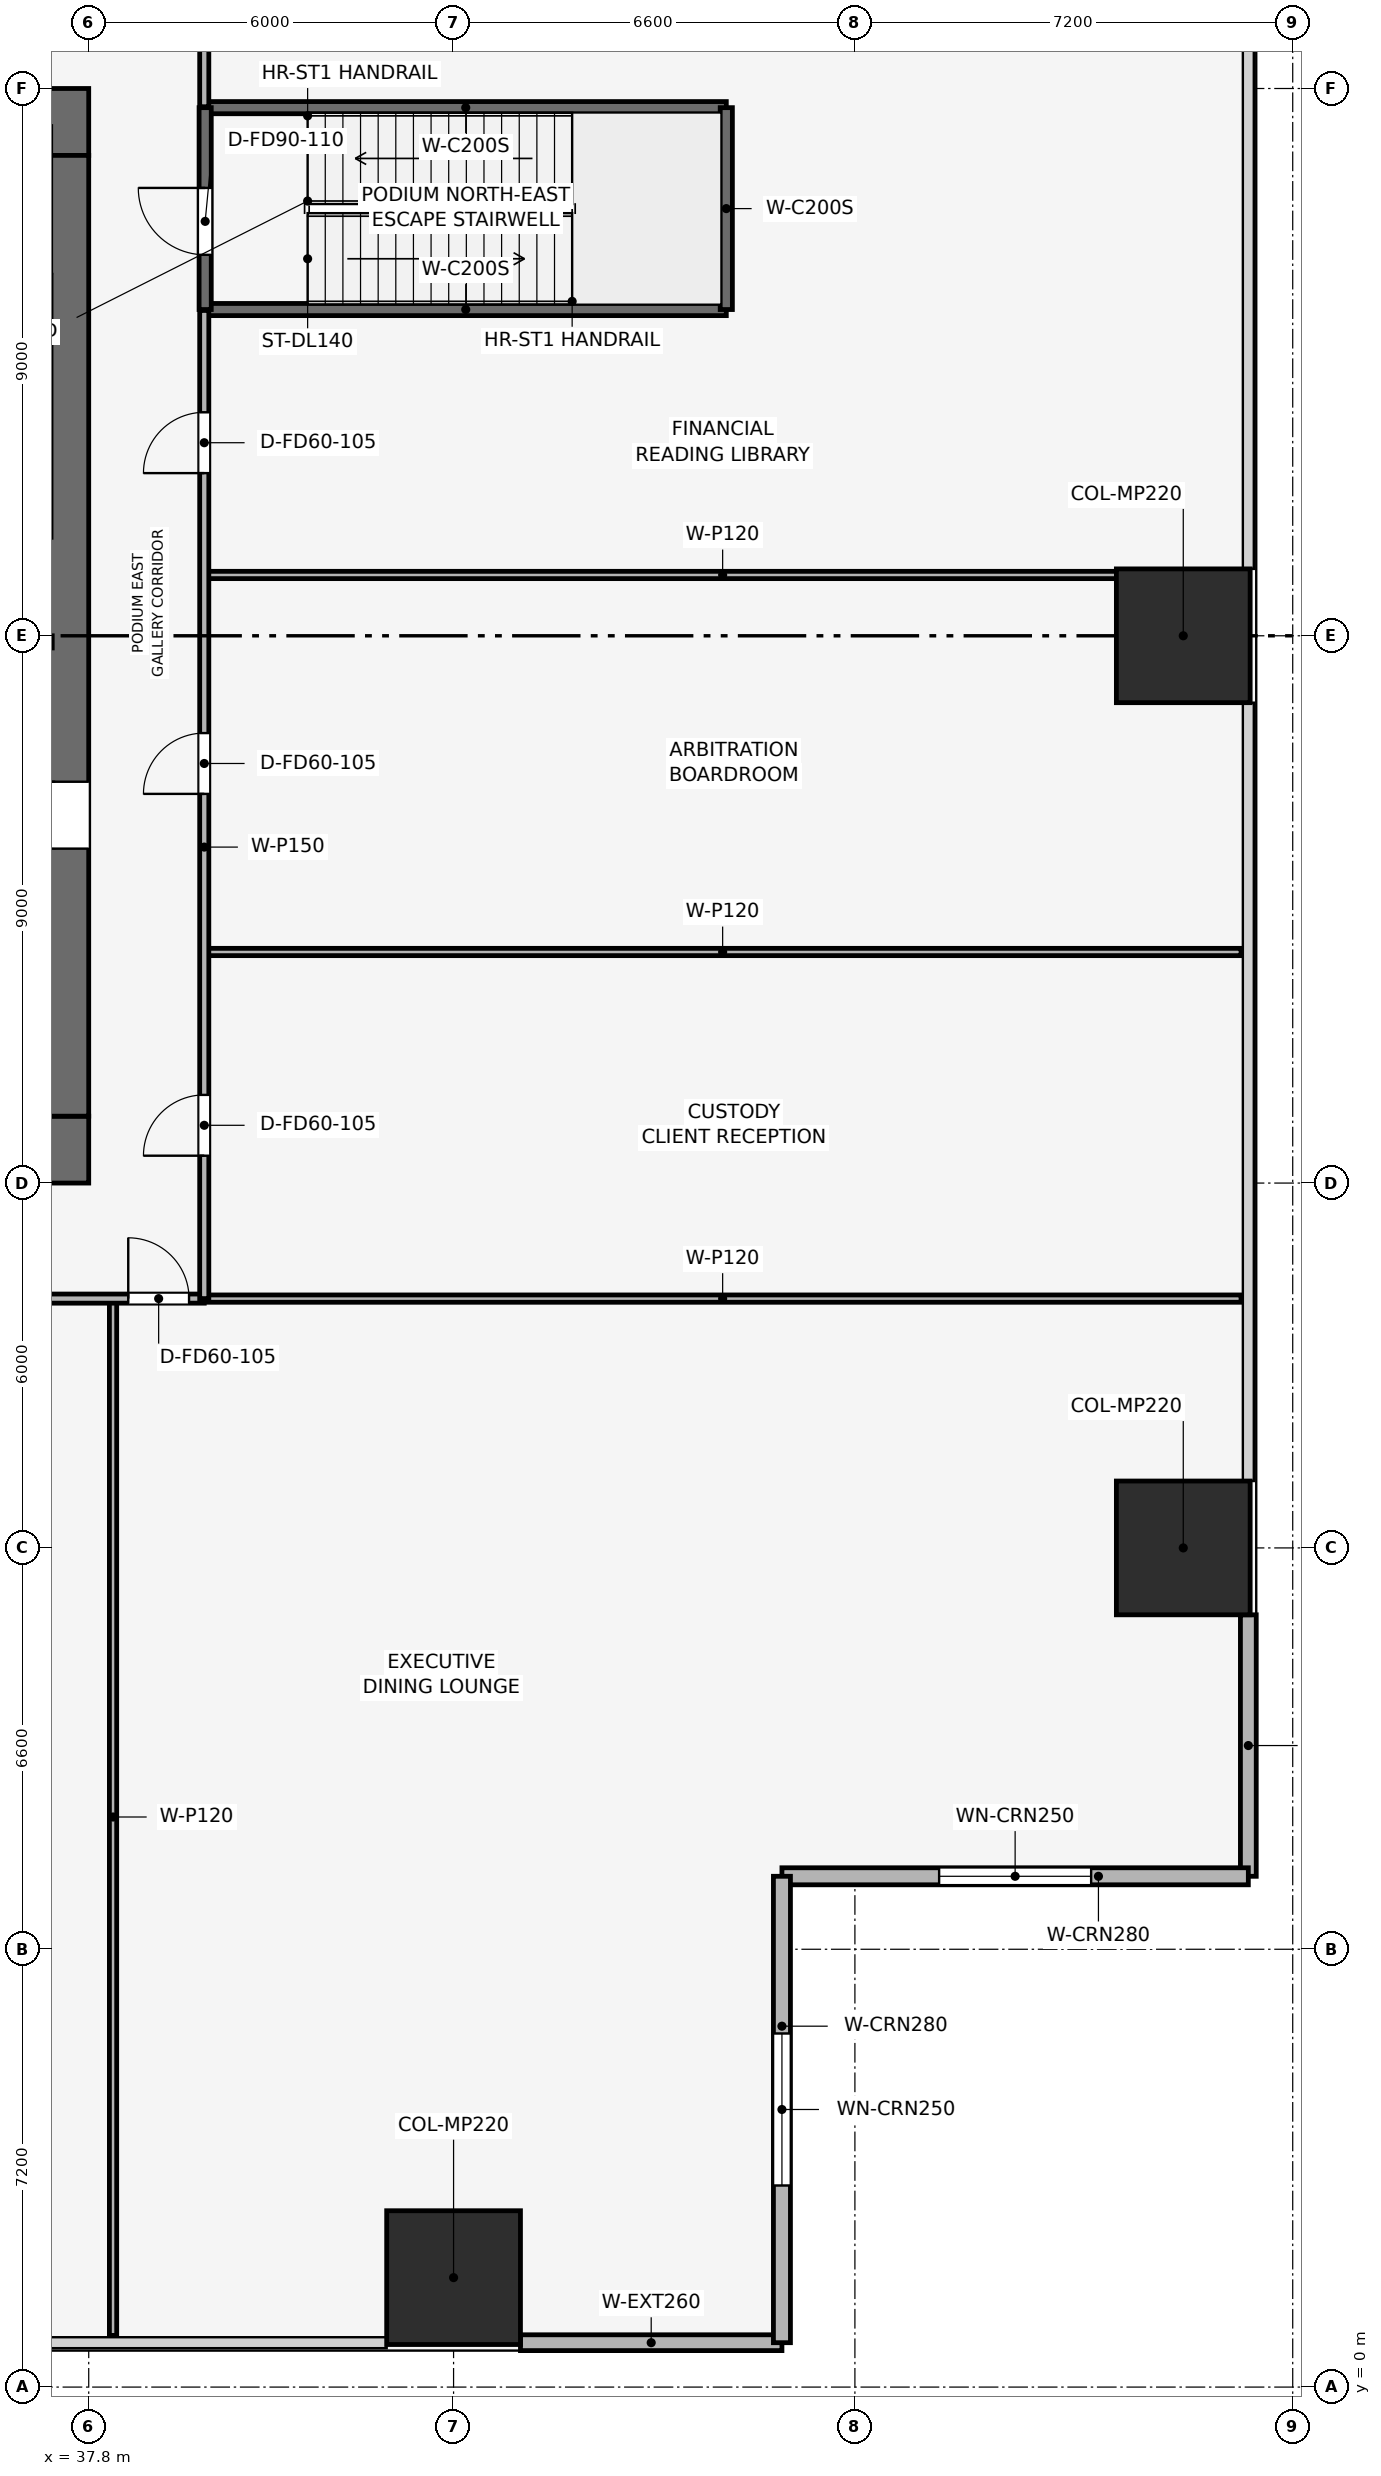
"""IFC4 building model, lengths in metres.
Left out: names, types, materials, properties, quantities, classifications, styles, units other than length and angle.
Written with IfcOpenShell. Run it as: python <this file> out.ifc"""

import sys

from ifc_helpers import new_model, si_unit, direction, frame, frame_2d, origin, origin_2d, place, context, subcontext, project, spatial, rectangle, extrude, element, fill, save


model = new_model("IFC4")
c1 = context("Model", 3, precision=1e-05, world=origin(), true_north=direction((0.0, 1.0)))
c2 = subcontext(c1, "Body", "Model", "MODEL_VIEW")
j1 = project(units=[si_unit("LENGTHUNIT", "METRE"), si_unit("PLANEANGLEUNIT", "RADIAN")], contexts=[c1])
p1 = place(None, origin())
s1 = spatial("IfcSite", under=j1, at=p1, CompositionType="ELEMENT")
p2 = place(p1, origin())
s2 = spatial("IfcBuilding", under=s1, at=p2, CompositionType="ELEMENT")
p3 = place(p2, frame((0.0, 0.0, 13.8)))
s3 = spatial("IfcBuildingStorey", under=s2, at=p3, CompositionType="ELEMENT", Elevation=13.8)
p4 = place(p3, frame((19.8, 20.35, 0.0), z_axis=(0.0, 0.0, 1.0), x_axis=(1.0, 0.0, 0.0)))
e1 = element("IfcWall", 1, at=p4, inside=s3, PredefinedType="SHEAR", context=c2, shape_type="SweptSolid", body=[
    extrude(rectangle(XDim=18.0, YDim=1.1, at=frame_2d((9.0, 0.0))), origin(), (0.0, 0.0, 1.0), 5.4),
])
p5 = place(p4, frame((8.4, 0.0, 0.0)))
e2 = element("IfcOpeningElement", 2, at=p5, cuts=e1, PredefinedType="OPENING", context=c2, shape_type="SweptSolid", body=[
    extrude(rectangle(XDim=1.2, YDim=2.2, at=frame_2d((0.6, 1.1))), frame((0.0, 0.56, 0.0), z_axis=(0.0, -1.0, 0.0), x_axis=(1.0, 0.0, 0.0)), (0.0, 0.0, 1.0), 1.12),
])
p6 = place(p3, frame((19.8, 37.25, 0.0), z_axis=(0.0, 0.0, 1.0), x_axis=(1.0, 0.0, 0.0)))
e3 = element("IfcWall", 3, at=p6, inside=s3, PredefinedType="SHEAR", context=c2, shape_type="SweptSolid", body=[
    extrude(rectangle(XDim=18.0, YDim=1.1, at=frame_2d((9.0, 0.0))), origin(), (0.0, 0.0, 1.0), 5.4),
])
p7 = place(p6, frame((7.05, 0.0, 0.0)))
e4 = element("IfcOpeningElement", 4, at=p7, cuts=e3, PredefinedType="OPENING", context=c2, shape_type="SweptSolid", body=[
    extrude(rectangle(XDim=1.1, YDim=2.15, at=frame_2d((0.55, 1.075))), frame((0.0, 0.56, 0.0), z_axis=(0.0, -1.0, 0.0), x_axis=(1.0, 0.0, 0.0)), (0.0, 0.0, 1.0), 1.12),
])
p8 = place(p3, frame((37.25, 20.9, 0.0), z_axis=(0.0, 0.0, 1.0), x_axis=(0.0, 1.0, 0.0)))
e5 = element("IfcWall", 5, at=p8, inside=s3, PredefinedType="SHEAR", context=c2, shape_type="SweptSolid", body=[
    extrude(rectangle(XDim=15.8, YDim=1.1, at=frame_2d((7.9, 0.0))), origin(), (0.0, 0.0, 1.0), 5.4),
])
p9 = place(p8, frame((4.4, 0.0, 0.0)))
e6 = element("IfcOpeningElement", 6, at=p9, cuts=e5, PredefinedType="OPENING", context=c2, shape_type="SweptSolid", body=[
    extrude(rectangle(XDim=1.1, YDim=2.15, at=frame_2d((0.55, 1.075))), frame((0.0, 0.56, 0.0), z_axis=(0.0, -1.0, 0.0), x_axis=(1.0, 0.0, 0.0)), (0.0, 0.0, 1.0), 1.12),
])
for number, where, z_axis, x_axis in (
    (7, (43.8, 1.8, 0.002), (0.0, 0.0, 1.0), (1.0, 0.0, 0.0)),
    (8, (55.8, 13.8, 0.002), (0.0, 0.0, 1.0), (1.0, 0.0, 0.0)),
    (9, (55.8, 28.8, 0.002), (0.0, 0.0, 1.0), (1.0, 0.0, 0.0)),
):
    element("IfcColumn", number, at=place(p3, frame(where, z_axis=z_axis, x_axis=x_axis)), inside=s3, PredefinedType="PILASTER", context=c2, shape_type="SweptSolid", body=[
        extrude(rectangle(XDim=2.2, YDim=2.2, at=origin_2d()), origin(), (0.0, 0.0, 1.0), 5.396),
    ])
for number, where, z_axis, x_axis in (
    (10, (49.2, 0.73, 0.0), (0.0, 0.0, 1.0), (-1.0, 0.0, 0.0)),
    (11, (56.87, 12.7, 0.0), (0.0, 0.0, 1.0), (0.0, -1.0, 0.0)),
):
    element("IfcWall", number, at=place(p3, frame(where, z_axis=z_axis, x_axis=x_axis)), inside=s3, PredefinedType="SOLIDWALL", context=c2, shape_type="SweptSolid", body=[
        extrude(rectangle(XDim=4.3, YDim=0.26, at=frame_2d((2.15, 0.0))), origin(), (0.0, 0.0, 1.0), 5.05),
    ])
p10 = place(p3, frame((56.87, 8.4, 0.0), z_axis=(0.0, 0.0, 1.0), x_axis=(-1.0, 0.0, 0.0)))
e12 = element("IfcWall", 12, at=p10, inside=s3, PredefinedType="SOLIDWALL", context=c2, shape_type="SweptSolid", body=[
    extrude(rectangle(XDim=7.67, YDim=0.28, at=frame_2d((3.835, 0.0))), origin(), (0.0, 0.0, 1.0), 5.05),
])
p11 = place(p10, frame((2.585, 0.0, 0.9)))
e13 = element("IfcOpeningElement", 13, at=p11, cuts=e12, PredefinedType="OPENING", context=c2, shape_type="SweptSolid", body=[
    extrude(rectangle(XDim=2.5, YDim=1.9, at=frame_2d((1.25, 0.95))), frame((0.0, 0.15, 0.0), z_axis=(0.0, -1.0, 0.0), x_axis=(1.0, 0.0, 0.0)), (0.0, 0.0, 1.0), 0.3),
])
p12 = place(p3, frame((49.2, 8.4, 0.0), z_axis=(0.0, 0.0, 1.0), x_axis=(0.0, -1.0, 0.0)))
e14 = element("IfcWall", 14, at=p12, inside=s3, PredefinedType="SOLIDWALL", context=c2, shape_type="SweptSolid", body=[
    extrude(rectangle(XDim=7.67, YDim=0.28, at=frame_2d((3.835, 0.0))), origin(), (0.0, 0.0, 1.0), 5.05),
])
p13 = place(p12, frame((2.585, 0.0, 0.9)))
e15 = element("IfcOpeningElement", 15, at=p13, cuts=e14, PredefinedType="OPENING", context=c2, shape_type="SweptSolid", body=[
    extrude(rectangle(XDim=2.5, YDim=1.9, at=frame_2d((1.25, 0.95))), frame((0.0, 0.15, 0.0), z_axis=(0.0, -1.0, 0.0), x_axis=(1.0, 0.0, 0.0)), (0.0, 0.0, 1.0), 0.3),
])
for number, where, z_axis, x_axis in (
    (16, (39.715, 34.165, 0.0), (0.0, 0.0, 1.0), (1.0, 0.0, 0.0)),
    (17, (39.715, 37.485, 0.0), (0.0, 0.0, 1.0), (1.0, 0.0, 0.0)),
):
    element("IfcWall", number, at=place(p3, frame(where, z_axis=z_axis, x_axis=x_axis)), inside=s3, PredefinedType="SHEAR", context=c2, shape_type="SweptSolid", body=[
        extrude(rectangle(XDim=8.57, YDim=0.2, at=frame_2d((4.285, 0.0))), origin(), (0.0, 0.0, 1.0), 5.398),
    ])
p14 = place(p3, frame((48.285, 34.165, 0.0), z_axis=(0.0, 0.0, 1.0), x_axis=(0.0, 1.0, 0.0)))
e18 = element("IfcWall", 18, at=p14, inside=s3, PredefinedType="SHEAR", context=c2, shape_type="SweptSolid", body=[
    extrude(rectangle(XDim=3.32, YDim=0.2, at=frame_2d((1.66, 0.0))), origin(), (0.0, 0.0, 1.0), 5.398),
])
p15 = place(p3, frame((39.715, 34.165, 0.0), z_axis=(0.0, 0.0, 1.0), x_axis=(0.0, 1.0, 0.0)))
e19 = element("IfcWall", 19, at=p15, inside=s3, PredefinedType="SHEAR", context=c2, shape_type="SweptSolid", body=[
    extrude(rectangle(XDim=3.32, YDim=0.2, at=frame_2d((1.66, 0.0))), origin(), (0.0, 0.0, 1.0), 5.398),
])
p16 = place(p15, frame((0.9, 0.0, 0.0)))
e20 = element("IfcOpeningElement", 20, at=p16, cuts=e19, PredefinedType="OPENING", context=c2, shape_type="SweptSolid", body=[
    extrude(rectangle(XDim=1.1, YDim=2.15, at=frame_2d((0.55, 1.075))), frame((0.0, 0.11, 0.0), z_axis=(0.0, -1.0, 0.0), x_axis=(1.0, 0.0, 0.0)), (0.0, 0.0, 1.0), 0.22),
])
p17 = place(p3, frame((38.2, 0.85, 0.0), z_axis=(0.0, 0.0, 1.0), x_axis=(0.0, 1.0, 0.0)))
e21 = element("IfcWall", 21, at=p17, inside=s3, PredefinedType="PARTITIONING", context=c2, shape_type="SweptSolid", body=[
    extrude(rectangle(XDim=17.05, YDim=0.12, at=frame_2d((8.525, 0.0))), origin(), (0.0, 0.0, 1.0), 4.035),
])
for number, where, z_axis, x_axis in (
    (22, (39.7, 23.6, 0.0), (0.0, 0.0, 1.0), (1.0, 0.0, 0.0)),
    (23, (39.7, 29.8, 0.0), (0.0, 0.0, 1.0), (1.0, 0.0, 0.0)),
    (24, (39.7, 17.9, 0.0), (0.0, 0.0, 1.0), (1.0, 0.0, 0.0)),
):
    element("IfcWall", number, at=place(p3, frame(where, z_axis=z_axis, x_axis=x_axis)), inside=s3, PredefinedType="PARTITIONING", context=c2, shape_type="SweptSolid", body=[
        extrude(rectangle(XDim=17.05, YDim=0.12, at=frame_2d((8.525, 0.0))), origin(), (0.0, 0.0, 1.0), 4.035),
    ])
p18 = place(p3, frame((17.9, 17.9, 0.0), z_axis=(0.0, 0.0, 1.0), x_axis=(1.0, 0.0, 0.0)))
e25 = element("IfcWall", 25, at=p18, inside=s3, PredefinedType="PARTITIONING", context=c2, shape_type="SweptSolid", body=[
    extrude(rectangle(XDim=21.8, YDim=0.15, at=frame_2d((10.9, 0.0))), origin(), (0.0, 0.0, 1.0), 4.135),
])
p19 = place(p18, frame((0.95, 0.0, 0.0)))
e26 = element("IfcOpeningElement", 26, at=p19, cuts=e25, PredefinedType="OPENING", context=c2, shape_type="SweptSolid", body=[
    extrude(rectangle(XDim=1.0, YDim=2.15, at=frame_2d((0.5, 1.075))), frame((0.0, 0.085, 0.0), z_axis=(0.0, -1.0, 0.0), x_axis=(1.0, 0.0, 0.0)), (0.0, 0.0, 1.0), 0.17),
])
p20 = place(p18, frame((6.8, 0.0, 0.0)))
e27 = element("IfcOpeningElement", 27, at=p20, cuts=e25, PredefinedType="OPENING", context=c2, shape_type="SweptSolid", body=[
    extrude(rectangle(XDim=1.0, YDim=2.15, at=frame_2d((0.5, 1.075))), frame((0.0, 0.085, 0.0), z_axis=(0.0, -1.0, 0.0), x_axis=(1.0, 0.0, 0.0)), (0.0, 0.0, 1.0), 0.17),
])
p21 = place(p18, frame((15.5, 0.0, 0.0)))
e28 = element("IfcOpeningElement", 28, at=p21, cuts=e25, PredefinedType="OPENING", context=c2, shape_type="SweptSolid", body=[
    extrude(rectangle(XDim=1.0, YDim=2.15, at=frame_2d((0.5, 1.075))), frame((0.0, 0.085, 0.0), z_axis=(0.0, -1.0, 0.0), x_axis=(1.0, 0.0, 0.0)), (0.0, 0.0, 1.0), 0.17),
])
p22 = place(p18, frame((20.55, 0.0, 0.0)))
e29 = element("IfcOpeningElement", 29, at=p22, cuts=e25, PredefinedType="OPENING", context=c2, shape_type="SweptSolid", body=[
    extrude(rectangle(XDim=1.0, YDim=2.15, at=frame_2d((0.5, 1.075))), frame((0.0, 0.085, 0.0), z_axis=(0.0, -1.0, 0.0), x_axis=(1.0, 0.0, 0.0)), (0.0, 0.0, 1.0), 0.17),
])
p23 = place(p3, frame((39.7, 17.9, 0.0), z_axis=(0.0, 0.0, 1.0), x_axis=(0.0, 1.0, 0.0)))
e30 = element("IfcWall", 30, at=p23, inside=s3, PredefinedType="PARTITIONING", context=c2, shape_type="SweptSolid", body=[
    extrude(rectangle(XDim=16.25, YDim=0.15, at=frame_2d((8.125, 0.0))), origin(), (0.0, 0.0, 1.0), 4.135),
])
p24 = place(p23, frame((2.35, 0.0, 0.0)))
e31 = element("IfcOpeningElement", 31, at=p24, cuts=e30, PredefinedType="OPENING", context=c2, shape_type="SweptSolid", body=[
    extrude(rectangle(XDim=1.0, YDim=2.15, at=frame_2d((0.5, 1.075))), frame((0.0, 0.085, 0.0), z_axis=(0.0, -1.0, 0.0), x_axis=(1.0, 0.0, 0.0)), (0.0, 0.0, 1.0), 0.17),
])
p25 = place(p23, frame((8.3, 0.0, 0.0)))
e32 = element("IfcOpeningElement", 32, at=p25, cuts=e30, PredefinedType="OPENING", context=c2, shape_type="SweptSolid", body=[
    extrude(rectangle(XDim=1.0, YDim=2.15, at=frame_2d((0.5, 1.075))), frame((0.0, 0.085, 0.0), z_axis=(0.0, -1.0, 0.0), x_axis=(1.0, 0.0, 0.0)), (0.0, 0.0, 1.0), 0.17),
])
p26 = place(p23, frame((13.575, 0.0, 0.0)))
e33 = element("IfcOpeningElement", 33, at=p26, cuts=e30, PredefinedType="OPENING", context=c2, shape_type="SweptSolid", body=[
    extrude(rectangle(XDim=1.0, YDim=2.15, at=frame_2d((0.5, 1.075))), frame((0.0, 0.085, 0.0), z_axis=(0.0, -1.0, 0.0), x_axis=(1.0, 0.0, 0.0)), (0.0, 0.0, 1.0), 0.17),
])
p27 = place(p3, frame((39.7, 37.5, 0.0), z_axis=(0.0, 0.0, 1.0), x_axis=(0.0, 1.0, 0.0)))
e34 = element("IfcWall", 34, at=p27, inside=s3, PredefinedType="PARTITIONING", context=c2, shape_type="SweptSolid", body=[
    extrude(rectangle(XDim=2.2, YDim=0.15, at=frame_2d((1.1, 0.0))), origin(), (0.0, 0.0, 1.0), 5.05),
])
p28 = place(p11, origin())
e35 = element("IfcWindow", 35, at=p28, inside=s3, PartitioningType="SINGLE_PANEL", PredefinedType="WINDOW", context=c2, shape_type="SweptSolid", body=[
    extrude(rectangle(XDim=2.5, YDim=1.9, at=frame_2d((1.25, 0.95))), frame((0.0, 0.03, 0.0), z_axis=(0.0, -1.0, 0.0), x_axis=(1.0, 0.0, 0.0)), (0.0, 0.0, 1.0), 0.06),
])
fill(e13, e35)
p29 = place(p13, origin())
e36 = element("IfcWindow", 36, at=p29, inside=s3, PartitioningType="SINGLE_PANEL", PredefinedType="WINDOW", context=c2, shape_type="SweptSolid", body=[
    extrude(rectangle(XDim=2.5, YDim=1.9, at=frame_2d((1.25, 0.95))), frame((0.0, 0.03, 0.0), z_axis=(0.0, -1.0, 0.0), x_axis=(1.0, 0.0, 0.0)), (0.0, 0.0, 1.0), 0.06),
])
fill(e15, e36)
p30 = place(p16, origin())
e37 = element("IfcDoor", 37, at=p30, inside=s3, OperationType="SINGLE_SWING_RIGHT", PredefinedType="DOOR", context=c2, shape_type="SweptSolid", body=[
    extrude(rectangle(XDim=1.1, YDim=2.15, at=frame_2d((0.55, 1.075))), frame((0.0, 0.025, 0.0), z_axis=(0.0, -1.0, 0.0), x_axis=(1.0, 0.0, 0.0)), (0.0, 0.0, 1.0), 0.05),
])
fill(e20, e37)
p31 = place(p22, origin())
e38 = element("IfcDoor", 38, at=p31, inside=s3, OperationType="SINGLE_SWING_LEFT", PredefinedType="DOOR", context=c2, shape_type="SweptSolid", body=[
    extrude(rectangle(XDim=1.0, YDim=2.15, at=frame_2d((0.5, 1.075))), frame((0.0, 0.025, 0.0), z_axis=(0.0, -1.0, 0.0), x_axis=(1.0, 0.0, 0.0)), (0.0, 0.0, 1.0), 0.05),
])
fill(e29, e38)
p32 = place(p24, origin())
e39 = element("IfcDoor", 39, at=p32, inside=s3, OperationType="SINGLE_SWING_LEFT", PredefinedType="DOOR", context=c2, shape_type="SweptSolid", body=[
    extrude(rectangle(XDim=1.0, YDim=2.15, at=frame_2d((0.5, 1.075))), frame((0.0, 0.025, 0.0), z_axis=(0.0, -1.0, 0.0), x_axis=(1.0, 0.0, 0.0)), (0.0, 0.0, 1.0), 0.05),
])
fill(e31, e39)
p33 = place(p25, origin())
e40 = element("IfcDoor", 40, at=p33, inside=s3, OperationType="SINGLE_SWING_LEFT", PredefinedType="DOOR", context=c2, shape_type="SweptSolid", body=[
    extrude(rectangle(XDim=1.0, YDim=2.15, at=frame_2d((0.5, 1.075))), frame((0.0, 0.025, 0.0), z_axis=(0.0, -1.0, 0.0), x_axis=(1.0, 0.0, 0.0)), (0.0, 0.0, 1.0), 0.05),
])
fill(e32, e40)
p34 = place(p26, origin())
e41 = element("IfcDoor", 41, at=p34, inside=s3, OperationType="SINGLE_SWING_LEFT", PredefinedType="DOOR", context=c2, shape_type="SweptSolid", body=[
    extrude(rectangle(XDim=1.0, YDim=2.15, at=frame_2d((0.5, 1.075))), frame((0.0, 0.025, 0.0), z_axis=(0.0, -1.0, 0.0), x_axis=(1.0, 0.0, 0.0)), (0.0, 0.0, 1.0), 0.05),
])
fill(e33, e41)
p35 = place(p9, origin())
e42 = element("IfcDoor", 42, at=p35, inside=s3, OperationType="SINGLE_SWING_RIGHT", PredefinedType="DOOR", context=c2, shape_type="SweptSolid", body=[
    extrude(rectangle(XDim=1.1, YDim=2.15, at=frame_2d((0.55, 1.075))), frame((0.0, 0.025, 0.0), z_axis=(0.0, -1.0, 0.0), x_axis=(1.0, 0.0, 0.0)), (0.0, 0.0, 1.0), 0.05),
])
fill(e6, e42)
save(model, sys.argv[1])
